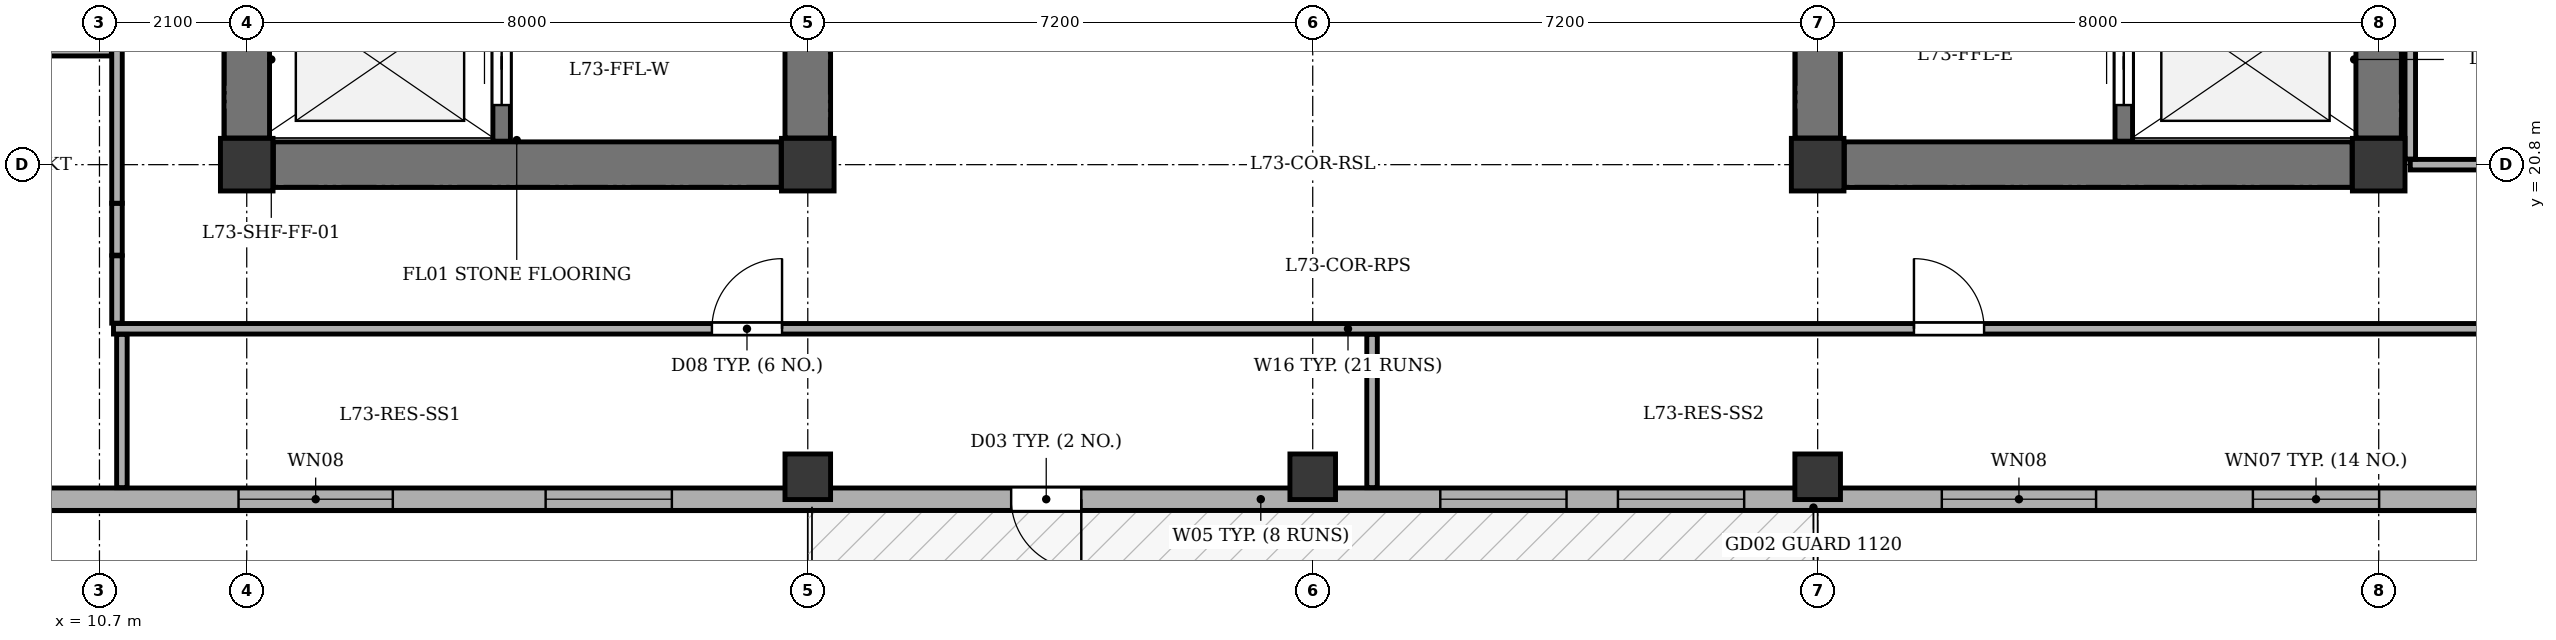
"""IFC4 building model, lengths in metres.
Left out: names, types, materials, properties, quantities, classifications, styles, units other than length and angle.
Written with IfcOpenShell. Run it as: python <this file> out.ifc"""

import sys

from ifc_helpers import new_model, si_unit, direction, frame, frame_2d, origin, origin_2d, place, context, subcontext, project, spatial, rectangle, extrude, element, fill, save


model = new_model("IFC4")
c1 = context("Model", 3, precision=1e-05, world=origin(), true_north=direction((0.0, 1.0)))
c2 = subcontext(c1, "Body", "Model", "MODEL_VIEW")
j1 = project(units=[si_unit("LENGTHUNIT", "METRE"), si_unit("PLANEANGLEUNIT", "RADIAN")], contexts=[c1])
p1 = place(None, origin())
s1 = spatial("IfcSite", under=j1, at=p1, CompositionType="ELEMENT")
p2 = place(p1, origin())
s2 = spatial("IfcBuilding", under=s1, at=p2, CompositionType="ELEMENT")
p3 = place(p2, frame((0.0, 0.0, 275.5)))
s3 = spatial("IfcBuildingStorey", under=s2, at=p3, CompositionType="ELEMENT", Elevation=275.5)
for number, where, z_axis, x_axis in (
    (1, (12.8, 20.8, 0.0), (0.0, 0.0, 1.0), (1.0, 0.0, 0.0)),
    (2, (20.8, 20.8, 0.0), (0.0, 0.0, 1.0), (1.0, 0.0, 0.0)),
    (3, (35.2, 20.8, 0.0), (0.0, 0.0, 1.0), (1.0, 0.0, 0.0)),
    (4, (43.2, 20.8, 0.0), (0.0, 0.0, 1.0), (1.0, 0.0, 0.0)),
):
    element("IfcColumn", number, at=place(p3, frame(where, z_axis=z_axis, x_axis=x_axis)), inside=s3, PredefinedType="COLUMN", context=c2, shape_type="SweptSolid", body=[
        extrude(rectangle(XDim=0.75, YDim=0.75, at=origin_2d()), origin(), (0.0, 0.0, 1.0), 3.4),
    ])
for number, where, z_axis, x_axis in (
    (5, (20.8, 16.35, 0.0), (0.0, 0.0, 1.0), (1.0, 0.0, 0.0)),
    (6, (28.0, 16.35, 0.0), (0.0, 0.0, 1.0), (1.0, 0.0, 0.0)),
    (7, (35.2, 16.35, 0.0), (0.0, 0.0, 1.0), (1.0, 0.0, 0.0)),
):
    element("IfcColumn", number, at=place(p3, frame(where, z_axis=z_axis, x_axis=x_axis)), inside=s3, PredefinedType="COLUMN", context=c2, shape_type="SweptSolid", body=[
        extrude(rectangle(XDim=0.65, YDim=0.65, at=origin_2d()), origin(), (0.0, 0.0, 1.0), 3.4),
    ])
p4 = place(p3, frame((45.3, 16.03, 0.0), z_axis=(0.0, 0.0, 1.0), x_axis=(-1.0, 0.0, 0.0)))
e8 = element("IfcWall", 8, at=p4, inside=s3, PredefinedType="STANDARD", context=c2, shape_type="SweptSolid", body=[
    extrude(rectangle(XDim=37.0, YDim=0.32, at=frame_2d((18.5, 0.0))), origin(), (0.0, 0.0, 1.0), 2.725),
])
p5 = place(p4, frame((20.6, 0.0, 0.0)))
e9 = element("IfcOpeningElement", 9, at=p5, cuts=e8, PredefinedType="OPENING", context=c2, shape_type="SweptSolid", body=[
    extrude(rectangle(XDim=1.0, YDim=2.02, at=frame_2d((0.5, 1.01))), frame((0.0, 0.17, 0.0), z_axis=(0.0, -1.0, 0.0), x_axis=(1.0, 0.0, 0.0)), (0.0, 0.0, 1.0), 0.34),
])
p6 = place(p4, frame((2.094, 0.0, 0.75)))
e10 = element("IfcOpeningElement", 10, at=p6, cuts=e8, PredefinedType="OPENING", context=c2, shape_type="SweptSolid", body=[
    extrude(rectangle(XDim=1.8, YDim=1.7, at=frame_2d((0.9, 0.85))), frame((0.0, 0.17, 0.0), z_axis=(0.0, -1.0, 0.0), x_axis=(1.0, 0.0, 0.0)), (0.0, 0.0, 1.0), 0.34),
])
p7 = place(p4, frame((6.13, 0.0, 0.75)))
e11 = element("IfcOpeningElement", 11, at=p7, cuts=e8, PredefinedType="OPENING", context=c2, shape_type="SweptSolid", body=[
    extrude(rectangle(XDim=2.2, YDim=1.7, at=frame_2d((1.1, 0.85))), frame((0.0, 0.17, 0.0), z_axis=(0.0, -1.0, 0.0), x_axis=(1.0, 0.0, 0.0)), (0.0, 0.0, 1.0), 0.34),
])
p8 = place(p4, frame((11.148, 0.0, 0.75)))
e12 = element("IfcOpeningElement", 12, at=p8, cuts=e8, PredefinedType="OPENING", context=c2, shape_type="SweptSolid", body=[
    extrude(rectangle(XDim=1.8, YDim=1.7, at=frame_2d((0.9, 0.85))), frame((0.0, 0.17, 0.0), z_axis=(0.0, -1.0, 0.0), x_axis=(1.0, 0.0, 0.0)), (0.0, 0.0, 1.0), 0.34),
])
p9 = place(p4, frame((13.681, 0.0, 0.75)))
e13 = element("IfcOpeningElement", 13, at=p9, cuts=e8, PredefinedType="OPENING", context=c2, shape_type="SweptSolid", body=[
    extrude(rectangle(XDim=1.8, YDim=1.7, at=frame_2d((0.9, 0.85))), frame((0.0, 0.17, 0.0), z_axis=(0.0, -1.0, 0.0), x_axis=(1.0, 0.0, 0.0)), (0.0, 0.0, 1.0), 0.34),
])
p10 = place(p4, frame((26.438, 0.0, 0.75)))
e14 = element("IfcOpeningElement", 14, at=p10, cuts=e8, PredefinedType="OPENING", context=c2, shape_type="SweptSolid", body=[
    extrude(rectangle(XDim=1.8, YDim=1.7, at=frame_2d((0.9, 0.85))), frame((0.0, 0.17, 0.0), z_axis=(0.0, -1.0, 0.0), x_axis=(1.0, 0.0, 0.0)), (0.0, 0.0, 1.0), 0.34),
])
p11 = place(p4, frame((30.417, 0.0, 0.75)))
e15 = element("IfcOpeningElement", 15, at=p11, cuts=e8, PredefinedType="OPENING", context=c2, shape_type="SweptSolid", body=[
    extrude(rectangle(XDim=2.2, YDim=1.7, at=frame_2d((1.1, 0.85))), frame((0.0, 0.17, 0.0), z_axis=(0.0, -1.0, 0.0), x_axis=(1.0, 0.0, 0.0)), (0.0, 0.0, 1.0), 0.34),
])
p12 = place(p3, frame((12.8, 21.18, 0.0), z_axis=(0.0, 0.0, 1.0), x_axis=(0.0, 1.0, 0.0)))
e16 = element("IfcWall", 16, at=p12, inside=s3, PredefinedType="SHEAR", context=c2, shape_type="SweptSolid", body=[
    extrude(rectangle(XDim=12.04, YDim=0.65, at=frame_2d((6.02, 0.0))), origin(), (0.0, 0.0, 1.0), 3.1),
])
p13 = place(p3, frame((13.18, 20.8, 0.0), z_axis=(0.0, 0.0, 1.0), x_axis=(1.0, 0.0, 0.0)))
e17 = element("IfcWall", 17, at=p13, inside=s3, PredefinedType="SHEAR", context=c2, shape_type="SweptSolid", body=[
    extrude(rectangle(XDim=7.24, YDim=0.65, at=frame_2d((3.62, 0.0))), origin(), (0.0, 0.0, 1.0), 3.1),
])
p14 = place(p3, frame((20.8, 21.18, 0.0), z_axis=(0.0, 0.0, 1.0), x_axis=(0.0, 1.0, 0.0)))
e18 = element("IfcWall", 18, at=p14, inside=s3, PredefinedType="SHEAR", context=c2, shape_type="SweptSolid", body=[
    extrude(rectangle(XDim=3.87, YDim=0.65, at=frame_2d((1.935, 0.0))), origin(), (0.0, 0.0, 1.0), 3.1),
])
p15 = place(p14, frame((1.42, 0.0, 0.0)))
e19 = element("IfcOpeningElement", 19, at=p15, cuts=e18, PredefinedType="OPENING", context=c2, shape_type="SweptSolid", body=[
    extrude(rectangle(XDim=1.2, YDim=2.15, at=frame_2d((0.6, 1.075))), frame((0.0, 0.335, 0.0), z_axis=(0.0, -1.0, 0.0), x_axis=(1.0, 0.0, 0.0)), (0.0, 0.0, 1.0), 0.67),
])
p16 = place(p3, frame((16.435, 21.135, 0.0), z_axis=(0.0, 0.0, 1.0), x_axis=(0.0, 1.0, 0.0)))
e20 = element("IfcWall", 20, at=p16, inside=s3, PredefinedType="SHEAR", context=c2, shape_type="SweptSolid", body=[
    extrude(rectangle(XDim=12.13, YDim=0.25, at=frame_2d((6.065, 0.0))), origin(), (0.0, 0.0, 1.0), 3.1),
])
p17 = place(p16, frame((0.515, 0.0, 0.0)))
e21 = element("IfcOpeningElement", 21, at=p17, cuts=e20, PredefinedType="OPENING", context=c2, shape_type="SweptSolid", body=[
    extrude(rectangle(XDim=1.2, YDim=2.15, at=frame_2d((0.6, 1.075))), frame((0.0, 0.135, 0.0), z_axis=(0.0, -1.0, 0.0), x_axis=(1.0, 0.0, 0.0)), (0.0, 0.0, 1.0), 0.27),
])
p18 = place(p16, frame((2.665, 0.0, 0.0)))
e22 = element("IfcOpeningElement", 22, at=p18, cuts=e20, PredefinedType="OPENING", context=c2, shape_type="SweptSolid", body=[
    extrude(rectangle(XDim=1.15, YDim=2.15, at=frame_2d((0.575, 1.075))), frame((0.0, 0.135, 0.0), z_axis=(0.0, -1.0, 0.0), x_axis=(1.0, 0.0, 0.0)), (0.0, 0.0, 1.0), 0.27),
])
p19 = place(p3, frame((43.2, 21.18, 0.0), z_axis=(0.0, 0.0, 1.0), x_axis=(0.0, 1.0, 0.0)))
e23 = element("IfcWall", 23, at=p19, inside=s3, PredefinedType="SHEAR", context=c2, shape_type="SweptSolid", body=[
    extrude(rectangle(XDim=12.04, YDim=0.65, at=frame_2d((6.02, 0.0))), origin(), (0.0, 0.0, 1.0), 3.1),
])
p20 = place(p3, frame((35.58, 20.8, 0.0), z_axis=(0.0, 0.0, 1.0), x_axis=(1.0, 0.0, 0.0)))
e24 = element("IfcWall", 24, at=p20, inside=s3, PredefinedType="SHEAR", context=c2, shape_type="SweptSolid", body=[
    extrude(rectangle(XDim=7.24, YDim=0.65, at=frame_2d((3.62, 0.0))), origin(), (0.0, 0.0, 1.0), 3.1),
])
p21 = place(p3, frame((35.2, 21.18, 0.0), z_axis=(0.0, 0.0, 1.0), x_axis=(0.0, 1.0, 0.0)))
e25 = element("IfcWall", 25, at=p21, inside=s3, PredefinedType="SHEAR", context=c2, shape_type="SweptSolid", body=[
    extrude(rectangle(XDim=3.87, YDim=0.65, at=frame_2d((1.935, 0.0))), origin(), (0.0, 0.0, 1.0), 3.1),
])
p22 = place(p21, frame((1.42, 0.0, 0.0)))
e26 = element("IfcOpeningElement", 26, at=p22, cuts=e25, PredefinedType="OPENING", context=c2, shape_type="SweptSolid", body=[
    extrude(rectangle(XDim=1.2, YDim=2.15, at=frame_2d((0.6, 1.075))), frame((0.0, 0.335, 0.0), z_axis=(0.0, -1.0, 0.0), x_axis=(1.0, 0.0, 0.0)), (0.0, 0.0, 1.0), 0.67),
])
p23 = place(p3, frame((39.565, 21.135, 0.0), z_axis=(0.0, 0.0, 1.0), x_axis=(0.0, 1.0, 0.0)))
e27 = element("IfcWall", 27, at=p23, inside=s3, PredefinedType="SHEAR", context=c2, shape_type="SweptSolid", body=[
    extrude(rectangle(XDim=12.13, YDim=0.25, at=frame_2d((6.065, 0.0))), origin(), (0.0, 0.0, 1.0), 3.1),
])
p24 = place(p23, frame((0.515, 0.0, 0.0)))
e28 = element("IfcOpeningElement", 28, at=p24, cuts=e27, PredefinedType="OPENING", context=c2, shape_type="SweptSolid", body=[
    extrude(rectangle(XDim=1.2, YDim=2.15, at=frame_2d((0.6, 1.075))), frame((0.0, 0.135, 0.0), z_axis=(0.0, -1.0, 0.0), x_axis=(1.0, 0.0, 0.0)), (0.0, 0.0, 1.0), 0.27),
])
p25 = place(p23, frame((2.665, 0.0, 0.0)))
e29 = element("IfcOpeningElement", 29, at=p25, cuts=e27, PredefinedType="OPENING", context=c2, shape_type="SweptSolid", body=[
    extrude(rectangle(XDim=1.15, YDim=2.15, at=frame_2d((0.575, 1.075))), frame((0.0, 0.135, 0.0), z_axis=(0.0, -1.0, 0.0), x_axis=(1.0, 0.0, 0.0)), (0.0, 0.0, 1.0), 0.27),
])
p26 = place(p3, frame((10.9, 18.46, 0.0), z_axis=(0.0, 0.0, 1.0), x_axis=(1.0, 0.0, 0.0)))
e30 = element("IfcWall", 30, at=p26, inside=s3, PredefinedType="PARTITIONING", context=c2, shape_type="SweptSolid", body=[
    extrude(rectangle(XDim=34.52, YDim=0.15, at=frame_2d((17.26, 0.0))), origin(), (0.0, 0.0, 1.0), 3.1),
])
p27 = place(p26, frame((8.533, 0.0, 0.0)))
e31 = element("IfcOpeningElement", 31, at=p27, cuts=e30, PredefinedType="OPENING", context=c2, shape_type="SweptSolid", body=[
    extrude(rectangle(XDim=1.0, YDim=2.1, at=frame_2d((0.5, 1.05))), frame((0.0, 0.085, 0.0), z_axis=(0.0, -1.0, 0.0), x_axis=(1.0, 0.0, 0.0)), (0.0, 0.0, 1.0), 0.17),
])
p28 = place(p26, frame((25.673, 0.0, 0.0)))
e32 = element("IfcOpeningElement", 32, at=p28, cuts=e30, PredefinedType="OPENING", context=c2, shape_type="SweptSolid", body=[
    extrude(rectangle(XDim=1.0, YDim=2.1, at=frame_2d((0.5, 1.05))), frame((0.0, 0.085, 0.0), z_axis=(0.0, -1.0, 0.0), x_axis=(1.0, 0.0, 0.0)), (0.0, 0.0, 1.0), 0.17),
])
for number, where, z_axis, x_axis in (
    (33, (11.02, 16.195, 0.0), (0.0, 0.0, 1.0), (0.0, 1.0, 0.0)),
    (34, (28.846, 16.195, 0.0), (0.0, 0.0, 1.0), (0.0, 1.0, 0.0)),
):
    element("IfcWall", number, at=place(p3, frame(where, z_axis=z_axis, x_axis=x_axis)), inside=s3, PredefinedType="PARTITIONING", context=c2, shape_type="SweptSolid", body=[
        extrude(rectangle(XDim=2.185, YDim=0.15, at=frame_2d((1.092, 0.0))), origin(), (0.0, 0.0, 1.0), 3.1),
    ])
p29 = place(p3, frame((10.95, 19.5, 0.0), z_axis=(0.0, 0.0, 1.0), x_axis=(0.0, -1.0, 0.0)))
e35 = element("IfcWall", 35, at=p29, inside=s3, PredefinedType="PARTITIONING", context=c2, shape_type="SweptSolid", body=[
    extrude(rectangle(XDim=0.96, YDim=0.15, at=frame_2d((0.48, 0.0))), origin(), (0.0, 0.0, 1.0), 3.1),
])
p30 = place(p3, frame((10.95, 19.51, 0.0), z_axis=(0.0, 0.0, 1.0), x_axis=(0.0, 1.0, 0.0)))
e36 = element("IfcWall", 36, at=p30, inside=s3, PredefinedType="PARTITIONING", context=c2, shape_type="SweptSolid", body=[
    extrude(rectangle(XDim=0.74, YDim=0.15, at=frame_2d((0.37, 0.0))), origin(), (0.0, 0.0, 1.0), 3.1),
])
p31 = place(p3, frame((10.95, 20.25, 0.0), z_axis=(0.0, 0.0, 1.0), x_axis=(0.0, 1.0, 0.0)))
e37 = element("IfcWall", 37, at=p31, inside=s3, PredefinedType="PARTITIONING", context=c2, shape_type="SweptSolid", body=[
    extrude(rectangle(XDim=13.9, YDim=0.15, at=frame_2d((6.95, 0.0))), origin(), (0.0, 0.0, 1.0), 3.1),
])
p32 = place(p3, frame((4.645, 22.4, 0.0), z_axis=(0.0, 0.0, 1.0), x_axis=(1.0, 0.0, 0.0)))
e38 = element("IfcWall", 38, at=p32, inside=s3, PredefinedType="PARTITIONING", context=c2, shape_type="SweptSolid", body=[
    extrude(rectangle(XDim=6.225, YDim=0.1, at=frame_2d((3.113, 0.0))), origin(), (0.0, 0.0, 1.0), 3.1),
])
p33 = place(p32, frame((0.472, 0.0, 0.0)))
e39 = element("IfcOpeningElement", 39, at=p33, cuts=e38, PredefinedType="OPENING", context=c2, shape_type="SweptSolid", body=[
    extrude(rectangle(XDim=0.85, YDim=2.05, at=frame_2d((0.425, 1.025))), frame((0.0, 0.06, 0.0), z_axis=(0.0, -1.0, 0.0), x_axis=(1.0, 0.0, 0.0)), (0.0, 0.0, 1.0), 0.12),
])
p34 = place(p32, frame((2.092, 0.0, 0.0)))
e40 = element("IfcOpeningElement", 40, at=p34, cuts=e38, PredefinedType="OPENING", context=c2, shape_type="SweptSolid", body=[
    extrude(rectangle(XDim=0.85, YDim=2.05, at=frame_2d((0.425, 1.025))), frame((0.0, 0.06, 0.0), z_axis=(0.0, -1.0, 0.0), x_axis=(1.0, 0.0, 0.0)), (0.0, 0.0, 1.0), 0.12),
])
p35 = place(p32, frame((4.285, 0.0, 0.0)))
e41 = element("IfcOpeningElement", 41, at=p35, cuts=e38, PredefinedType="OPENING", context=c2, shape_type="SweptSolid", body=[
    extrude(rectangle(XDim=0.9, YDim=2.05, at=frame_2d((0.45, 1.025))), frame((0.0, 0.06, 0.0), z_axis=(0.0, -1.0, 0.0), x_axis=(1.0, 0.0, 0.0)), (0.0, 0.0, 1.0), 0.12),
])
p36 = place(p3, frame((43.65, 20.8, 0.0), z_axis=(0.0, 0.0, 1.0), x_axis=(1.0, 0.0, 0.0)))
e42 = element("IfcWall", 42, at=p36, inside=s3, PredefinedType="PARTITIONING", context=c2, shape_type="SweptSolid", body=[
    extrude(rectangle(XDim=5.305, YDim=0.15, at=frame_2d((2.653, 0.0))), origin(), (0.0, 0.0, 1.0), 2.535),
])
p37 = place(p3, frame((43.65, 20.88, 0.0), z_axis=(0.0, 0.0, 1.0), x_axis=(0.0, 1.0, 0.0)))
e43 = element("IfcWall", 43, at=p37, inside=s3, PredefinedType="PARTITIONING", context=c2, shape_type="SweptSolid", body=[
    extrude(rectangle(XDim=13.27, YDim=0.15, at=frame_2d((6.635, 0.0))), origin(), (0.0, 0.0, 1.0), 3.1),
])
p38 = place(p5, origin())
e44 = element("IfcDoor", 44, at=p38, inside=s3, OperationType="SINGLE_SWING_LEFT", PredefinedType="DOOR", context=c2, shape_type="SweptSolid", body=[
    extrude(rectangle(XDim=1.0, YDim=2.02, at=frame_2d((0.5, 1.01))), frame((0.0, 0.025, 0.0), z_axis=(0.0, -1.0, 0.0), x_axis=(1.0, 0.0, 0.0)), (0.0, 0.0, 1.0), 0.05),
])
fill(e9, e44)
p39 = place(p6, origin())
e45 = element("IfcWindow", 45, at=p39, inside=s3, PartitioningType="SINGLE_PANEL", PredefinedType="WINDOW", context=c2, shape_type="SweptSolid", body=[
    extrude(rectangle(XDim=1.8, YDim=1.7, at=frame_2d((0.9, 0.85))), frame((0.0, -0.01, 0.0), z_axis=(0.0, -1.0, 0.0), x_axis=(1.0, 0.0, 0.0)), (0.0, 0.0, 1.0), 0.06),
])
fill(e10, e45)
p40 = place(p7, origin())
e46 = element("IfcWindow", 46, at=p40, inside=s3, PartitioningType="SINGLE_PANEL", PredefinedType="WINDOW", context=c2, shape_type="SweptSolid", body=[
    extrude(rectangle(XDim=2.2, YDim=1.7, at=frame_2d((1.1, 0.85))), frame((0.0, -0.01, 0.0), z_axis=(0.0, -1.0, 0.0), x_axis=(1.0, 0.0, 0.0)), (0.0, 0.0, 1.0), 0.06),
])
fill(e11, e46)
p41 = place(p8, origin())
e47 = element("IfcWindow", 47, at=p41, inside=s3, PartitioningType="SINGLE_PANEL", PredefinedType="WINDOW", context=c2, shape_type="SweptSolid", body=[
    extrude(rectangle(XDim=1.8, YDim=1.7, at=frame_2d((0.9, 0.85))), frame((0.0, -0.01, 0.0), z_axis=(0.0, -1.0, 0.0), x_axis=(1.0, 0.0, 0.0)), (0.0, 0.0, 1.0), 0.06),
])
fill(e12, e47)
p42 = place(p9, origin())
e48 = element("IfcWindow", 48, at=p42, inside=s3, PartitioningType="SINGLE_PANEL", PredefinedType="WINDOW", context=c2, shape_type="SweptSolid", body=[
    extrude(rectangle(XDim=1.8, YDim=1.7, at=frame_2d((0.9, 0.85))), frame((0.0, -0.01, 0.0), z_axis=(0.0, -1.0, 0.0), x_axis=(1.0, 0.0, 0.0)), (0.0, 0.0, 1.0), 0.06),
])
fill(e13, e48)
p43 = place(p10, origin())
e49 = element("IfcWindow", 49, at=p43, inside=s3, PartitioningType="SINGLE_PANEL", PredefinedType="WINDOW", context=c2, shape_type="SweptSolid", body=[
    extrude(rectangle(XDim=1.8, YDim=1.7, at=frame_2d((0.9, 0.85))), frame((0.0, -0.01, 0.0), z_axis=(0.0, -1.0, 0.0), x_axis=(1.0, 0.0, 0.0)), (0.0, 0.0, 1.0), 0.06),
])
fill(e14, e49)
p44 = place(p11, origin())
e50 = element("IfcWindow", 50, at=p44, inside=s3, PartitioningType="SINGLE_PANEL", PredefinedType="WINDOW", context=c2, shape_type="SweptSolid", body=[
    extrude(rectangle(XDim=2.2, YDim=1.7, at=frame_2d((1.1, 0.85))), frame((0.0, -0.01, 0.0), z_axis=(0.0, -1.0, 0.0), x_axis=(1.0, 0.0, 0.0)), (0.0, 0.0, 1.0), 0.06),
])
fill(e15, e50)
p45 = place(p17, origin())
e51 = element("IfcDoor", 51, at=p45, inside=s3, OperationType="DOUBLE_DOOR_SLIDING", PredefinedType="DOOR", context=c2, shape_type="SweptSolid", body=[
    extrude(rectangle(XDim=1.2, YDim=2.15, at=frame_2d((0.6, 1.075))), frame((0.0, 0.025, 0.0), z_axis=(0.0, -1.0, 0.0), x_axis=(1.0, 0.0, 0.0)), (0.0, 0.0, 1.0), 0.05),
])
fill(e21, e51)
p46 = place(p24, origin())
e52 = element("IfcDoor", 52, at=p46, inside=s3, OperationType="DOUBLE_DOOR_SLIDING", PredefinedType="DOOR", context=c2, shape_type="SweptSolid", body=[
    extrude(rectangle(XDim=1.2, YDim=2.15, at=frame_2d((0.6, 1.075))), frame((0.0, 0.025, 0.0), z_axis=(0.0, -1.0, 0.0), x_axis=(1.0, 0.0, 0.0)), (0.0, 0.0, 1.0), 0.05),
])
fill(e28, e52)
p47 = place(p27, origin())
e53 = element("IfcDoor", 53, at=p47, inside=s3, OperationType="SINGLE_SWING_RIGHT", PredefinedType="DOOR", context=c2, shape_type="SweptSolid", body=[
    extrude(rectangle(XDim=1.0, YDim=2.1, at=frame_2d((0.5, 1.05))), frame((0.0, 0.025, 0.0), z_axis=(0.0, -1.0, 0.0), x_axis=(1.0, 0.0, 0.0)), (0.0, 0.0, 1.0), 0.05),
])
fill(e31, e53)
p48 = place(p28, origin())
e54 = element("IfcDoor", 54, at=p48, inside=s3, OperationType="SINGLE_SWING_LEFT", PredefinedType="DOOR", context=c2, shape_type="SweptSolid", body=[
    extrude(rectangle(XDim=1.0, YDim=2.1, at=frame_2d((0.5, 1.05))), frame((0.0, 0.025, 0.0), z_axis=(0.0, -1.0, 0.0), x_axis=(1.0, 0.0, 0.0)), (0.0, 0.0, 1.0), 0.05),
])
fill(e32, e54)
save(model, sys.argv[1])
